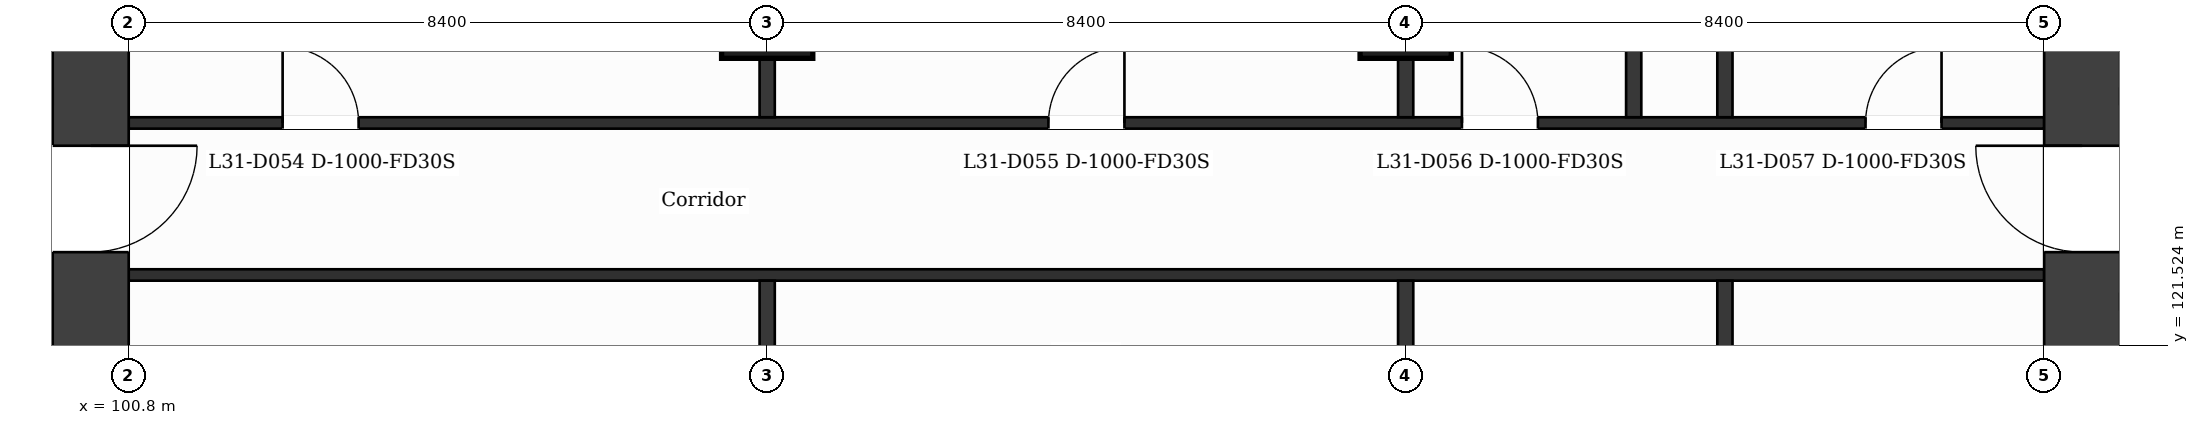
"""IFC4 building model, lengths in metres.
Left out: names, types, materials, properties, quantities, classifications, styles, units other than length and angle.
Written with IfcOpenShell. Run it as: python <this file> out.ifc"""

import sys

from ifc_helpers import new_model, si_unit, direction, frame, frame_2d, origin, origin_2d, place, context, subcontext, project, spatial, rectangle, extrude, element, fill, save


model = new_model("IFC4")
c1 = context("Model", 3, precision=1e-05, world=origin(), true_north=direction((0.0, 1.0)))
c2 = subcontext(c1, "Body", "Model", "MODEL_VIEW")
j1 = project(units=[si_unit("LENGTHUNIT", "METRE"), si_unit("PLANEANGLEUNIT", "RADIAN")], contexts=[c1])
p1 = place(None, origin())
s1 = spatial("IfcSite", under=j1, at=p1, CompositionType="ELEMENT")
p2 = place(p1, origin())
s2 = spatial("IfcBuilding", under=s1, at=p2, CompositionType="ELEMENT")
p3 = place(p2, frame((0.0, 0.0, 131.7)))
s3 = spatial("IfcBuildingStorey", under=s2, at=p3, CompositionType="ELEMENT", Elevation=131.7)
p4 = place(p3, frame((100.3, 131.9, 0.0), z_axis=(0.0, 0.0, 1.0), x_axis=(0.0, -1.0, 0.0)))
e1 = element("IfcWall", 1, at=p4, inside=s3, PredefinedType="SHEAR", context=c2, shape_type="SweptSolid", body=[
    extrude(rectangle(XDim=21.0, YDim=1.0, at=frame_2d((10.5, 0.0))), origin(), (0.0, 0.0, 1.0), 3.7),
])
p5 = place(p4, frame((7.75, 0.0, 0.0)))
e2 = element("IfcOpeningElement", 2, at=p5, cuts=e1, PredefinedType="OPENING", context=c2, shape_type="SweptSolid", body=[
    extrude(rectangle(XDim=1.4, YDim=2.1, at=frame_2d((0.7, 1.05))), frame((0.0, 0.51, 0.0), z_axis=(0.0, -1.0, 0.0), x_axis=(1.0, 0.0, 0.0)), (0.0, 0.0, 1.0), 1.02),
])
p6 = place(p3, frame((126.5, 110.9, 0.0), z_axis=(0.0, 0.0, 1.0), x_axis=(0.0, 1.0, 0.0)))
e3 = element("IfcWall", 3, at=p6, inside=s3, PredefinedType="SHEAR", context=c2, shape_type="SweptSolid", body=[
    extrude(rectangle(XDim=21.0, YDim=1.0, at=frame_2d((10.5, 0.0))), origin(), (0.0, 0.0, 1.0), 3.7),
])
p7 = place(p6, frame((11.85, 0.0, 0.0)))
e4 = element("IfcOpeningElement", 4, at=p7, cuts=e3, PredefinedType="OPENING", context=c2, shape_type="SweptSolid", body=[
    extrude(rectangle(XDim=1.4, YDim=2.1, at=frame_2d((0.7, 1.05))), frame((0.0, 0.51, 0.0), z_axis=(0.0, -1.0, 0.0), x_axis=(1.0, 0.0, 0.0)), (0.0, 0.0, 1.0), 1.02),
])
for number, where, z_axis, x_axis in (
    (5, (109.2, 125.9, 0.0), (0.0, 0.0, 1.0), (1.0, 0.0, 0.0)),
    (6, (117.6, 125.9, 0.0), (0.0, 0.0, 1.0), (1.0, 0.0, 0.0)),
):
    element("IfcColumn", number, at=place(p3, frame(where, z_axis=z_axis, x_axis=x_axis)), inside=s3, PredefinedType="COLUMN", context=c2, shape_type="SweptSolid", body=[
        extrude(rectangle(XDim=1.2, YDim=1.2, at=origin_2d()), origin(), (0.0, 0.0, 1.0), 3.7),
    ])
p8 = place(p3, frame((95.227, 122.1, 0.0), z_axis=(0.0, 0.0, 1.0), x_axis=(1.0, 0.0, 0.0)))
e7 = element("IfcWall", 7, at=p8, inside=s3, PredefinedType="PARTITIONING", context=c2, shape_type="SweptSolid", body=[
    extrude(rectangle(XDim=4.573, YDim=0.2, at=frame_2d((2.287, 0.0))), origin(), (0.0, 0.0, 1.0), 3.2),
])
p9 = place(p8, frame((0.865, 0.0, 0.0)))
e8 = element("IfcOpeningElement", 8, at=p9, cuts=e7, PredefinedType="OPENING", context=c2, shape_type="SweptSolid", body=[
    extrude(rectangle(XDim=0.9, YDim=2.1, at=frame_2d((0.45, 1.05))), frame((0.0, 0.11, 0.0), z_axis=(0.0, -1.0, 0.0), x_axis=(1.0, 0.0, 0.0)), (0.0, 0.0, 1.0), 0.22),
])
p10 = place(p8, frame((2.911, 0.0, 0.0)))
e9 = element("IfcOpeningElement", 9, at=p10, cuts=e7, PredefinedType="OPENING", context=c2, shape_type="SweptSolid", body=[
    extrude(rectangle(XDim=0.9, YDim=2.1, at=frame_2d((0.45, 1.05))), frame((0.0, 0.11, 0.0), z_axis=(0.0, -1.0, 0.0), x_axis=(1.0, 0.0, 0.0)), (0.0, 0.0, 1.0), 0.22),
])
p11 = place(p3, frame((100.8, 122.45, 0.0), z_axis=(0.0, 0.0, 1.0), x_axis=(1.0, 0.0, 0.0)))
e10 = element("IfcWall", 10, at=p11, inside=s3, PredefinedType="PARTITIONING", context=c2, shape_type="SweptSolid", body=[
    extrude(rectangle(XDim=25.2, YDim=0.15, at=frame_2d((12.6, 0.0))), origin(), (0.0, 0.0, 1.0), 3.2),
])
p12 = place(p3, frame((100.8, 124.45, 0.0), z_axis=(0.0, 0.0, 1.0), x_axis=(1.0, 0.0, 0.0)))
e11 = element("IfcWall", 11, at=p12, inside=s3, PredefinedType="PARTITIONING", context=c2, shape_type="SweptSolid", body=[
    extrude(rectangle(XDim=25.2, YDim=0.15, at=frame_2d((12.6, 0.0))), origin(), (0.0, 0.0, 1.0), 3.2),
])
p13 = place(p12, frame((2.025, 0.0, 0.0)))
e12 = element("IfcOpeningElement", 12, at=p13, cuts=e11, PredefinedType="OPENING", context=c2, shape_type="SweptSolid", body=[
    extrude(rectangle(XDim=1.0, YDim=2.1, at=frame_2d((0.5, 1.05))), frame((0.0, 0.085, 0.0), z_axis=(0.0, -1.0, 0.0), x_axis=(1.0, 0.0, 0.0)), (0.0, 0.0, 1.0), 0.17),
])
p14 = place(p12, frame((12.1, 0.0, 0.0)))
e13 = element("IfcOpeningElement", 13, at=p14, cuts=e11, PredefinedType="OPENING", context=c2, shape_type="SweptSolid", body=[
    extrude(rectangle(XDim=1.0, YDim=2.1, at=frame_2d((0.5, 1.05))), frame((0.0, 0.085, 0.0), z_axis=(0.0, -1.0, 0.0), x_axis=(1.0, 0.0, 0.0)), (0.0, 0.0, 1.0), 0.17),
])
p15 = place(p12, frame((17.54, 0.0, 0.0)))
e14 = element("IfcOpeningElement", 14, at=p15, cuts=e11, PredefinedType="OPENING", context=c2, shape_type="SweptSolid", body=[
    extrude(rectangle(XDim=1.0, YDim=2.1, at=frame_2d((0.5, 1.05))), frame((0.0, 0.085, 0.0), z_axis=(0.0, -1.0, 0.0), x_axis=(1.0, 0.0, 0.0)), (0.0, 0.0, 1.0), 0.17),
])
p16 = place(p12, frame((22.85, 0.0, 0.0)))
e15 = element("IfcOpeningElement", 15, at=p16, cuts=e11, PredefinedType="OPENING", context=c2, shape_type="SweptSolid", body=[
    extrude(rectangle(XDim=1.0, YDim=2.1, at=frame_2d((0.5, 1.05))), frame((0.0, 0.085, 0.0), z_axis=(0.0, -1.0, 0.0), x_axis=(1.0, 0.0, 0.0)), (0.0, 0.0, 1.0), 0.17),
])
p17 = place(p3, frame((127.0, 124.8, 0.0), z_axis=(0.0, 0.0, 1.0), x_axis=(1.0, 0.0, 0.0)))
e16 = element("IfcWall", 16, at=p17, inside=s3, PredefinedType="PARTITIONING", context=c2, shape_type="SweptSolid", body=[
    extrude(rectangle(XDim=4.649, YDim=0.2, at=frame_2d((2.324, 0.0))), origin(), (0.0, 0.0, 1.0), 3.2),
])
p18 = place(p17, frame((0.665, 0.0, 0.0)))
e17 = element("IfcOpeningElement", 17, at=p18, cuts=e16, PredefinedType="OPENING", context=c2, shape_type="SweptSolid", body=[
    extrude(rectangle(XDim=1.1, YDim=2.1, at=frame_2d((0.55, 1.05))), frame((0.0, 0.11, 0.0), z_axis=(0.0, -1.0, 0.0), x_axis=(1.0, 0.0, 0.0)), (0.0, 0.0, 1.0), 0.22),
])
p19 = place(p3, frame((109.2, 109.075, 0.0), z_axis=(0.0, 0.0, 1.0), x_axis=(0.0, 1.0, 0.0)))
e18 = element("IfcWall", 18, at=p19, inside=s3, PredefinedType="PARTITIONING", context=c2, shape_type="SweptSolid", body=[
    extrude(rectangle(XDim=13.3, YDim=0.2, at=frame_2d((6.65, 0.0))), origin(), (0.0, 0.0, 1.0), 3.2),
])
p20 = place(p3, frame((109.2, 124.525, 0.0), z_axis=(0.0, 0.0, 1.0), x_axis=(0.0, 1.0, 0.0)))
e19 = element("IfcWall", 19, at=p20, inside=s3, PredefinedType="PARTITIONING", context=c2, shape_type="SweptSolid", body=[
    extrude(rectangle(XDim=9.2, YDim=0.2, at=frame_2d((4.6, 0.0))), origin(), (0.0, 0.0, 1.0), 3.2),
])
p21 = place(p3, frame((117.6, 109.075, 0.0), z_axis=(0.0, 0.0, 1.0), x_axis=(0.0, 1.0, 0.0)))
e20 = element("IfcWall", 20, at=p21, inside=s3, PredefinedType="PARTITIONING", context=c2, shape_type="SweptSolid", body=[
    extrude(rectangle(XDim=13.3, YDim=0.2, at=frame_2d((6.65, 0.0))), origin(), (0.0, 0.0, 1.0), 3.2),
])
p22 = place(p3, frame((117.6, 124.525, 0.0), z_axis=(0.0, 0.0, 1.0), x_axis=(0.0, 1.0, 0.0)))
e21 = element("IfcWall", 21, at=p22, inside=s3, PredefinedType="PARTITIONING", context=c2, shape_type="SweptSolid", body=[
    extrude(rectangle(XDim=9.2, YDim=0.2, at=frame_2d((4.6, 0.0))), origin(), (0.0, 0.0, 1.0), 3.2),
])
p23 = place(p3, frame((120.6, 124.525, 0.0), z_axis=(0.0, 0.0, 1.0), x_axis=(0.0, 1.0, 0.0)))
e22 = element("IfcWall", 22, at=p23, inside=s3, PredefinedType="PARTITIONING", context=c2, shape_type="SweptSolid", body=[
    extrude(rectangle(XDim=5.825, YDim=0.2, at=frame_2d((2.913, 0.0))), origin(), (0.0, 0.0, 1.0), 3.2),
])
p24 = place(p3, frame((121.8, 109.075, 0.0), z_axis=(0.0, 0.0, 1.0), x_axis=(0.0, 1.0, 0.0)))
e23 = element("IfcWall", 23, at=p24, inside=s3, PredefinedType="PARTITIONING", context=c2, shape_type="SweptSolid", body=[
    extrude(rectangle(XDim=13.3, YDim=0.2, at=frame_2d((6.65, 0.0))), origin(), (0.0, 0.0, 1.0), 3.2),
])
p25 = place(p3, frame((121.8, 124.525, 0.0), z_axis=(0.0, 0.0, 1.0), x_axis=(0.0, 1.0, 0.0)))
e24 = element("IfcWall", 24, at=p25, inside=s3, PredefinedType="PARTITIONING", context=c2, shape_type="SweptSolid", body=[
    extrude(rectangle(XDim=9.2, YDim=0.2, at=frame_2d((4.6, 0.0))), origin(), (0.0, 0.0, 1.0), 3.2),
])
p26 = place(p13, origin())
e25 = element("IfcDoor", 25, at=p26, inside=s3, OperationType="SINGLE_SWING_LEFT", PredefinedType="DOOR", context=c2, shape_type="SweptSolid", body=[
    extrude(rectangle(XDim=1.0, YDim=2.1, at=frame_2d((0.5, 1.05))), frame((0.0, 0.025, 0.0), z_axis=(0.0, -1.0, 0.0), x_axis=(1.0, 0.0, 0.0)), (0.0, 0.0, 1.0), 0.05),
])
fill(e12, e25)
p27 = place(p14, origin())
e26 = element("IfcDoor", 26, at=p27, inside=s3, OperationType="SINGLE_SWING_RIGHT", PredefinedType="DOOR", context=c2, shape_type="SweptSolid", body=[
    extrude(rectangle(XDim=1.0, YDim=2.1, at=frame_2d((0.5, 1.05))), frame((0.0, 0.025, 0.0), z_axis=(0.0, -1.0, 0.0), x_axis=(1.0, 0.0, 0.0)), (0.0, 0.0, 1.0), 0.05),
])
fill(e13, e26)
p28 = place(p15, origin())
e27 = element("IfcDoor", 27, at=p28, inside=s3, OperationType="SINGLE_SWING_LEFT", PredefinedType="DOOR", context=c2, shape_type="SweptSolid", body=[
    extrude(rectangle(XDim=1.0, YDim=2.1, at=frame_2d((0.5, 1.05))), frame((0.0, 0.025, 0.0), z_axis=(0.0, -1.0, 0.0), x_axis=(1.0, 0.0, 0.0)), (0.0, 0.0, 1.0), 0.05),
])
fill(e14, e27)
p29 = place(p16, origin())
e28 = element("IfcDoor", 28, at=p29, inside=s3, OperationType="SINGLE_SWING_RIGHT", PredefinedType="DOOR", context=c2, shape_type="SweptSolid", body=[
    extrude(rectangle(XDim=1.0, YDim=2.1, at=frame_2d((0.5, 1.05))), frame((0.0, 0.025, 0.0), z_axis=(0.0, -1.0, 0.0), x_axis=(1.0, 0.0, 0.0)), (0.0, 0.0, 1.0), 0.05),
])
fill(e15, e28)
p30 = place(p5, origin())
e29 = element("IfcDoor", 29, at=p30, inside=s3, OperationType="SINGLE_SWING_LEFT", PredefinedType="DOOR", context=c2, shape_type="SweptSolid", body=[
    extrude(rectangle(XDim=1.4, YDim=2.1, at=frame_2d((0.7, 1.05))), frame((0.0, 0.025, 0.0), z_axis=(0.0, -1.0, 0.0), x_axis=(1.0, 0.0, 0.0)), (0.0, 0.0, 1.0), 0.05),
])
fill(e2, e29)
p31 = place(p7, origin())
e30 = element("IfcDoor", 30, at=p31, inside=s3, OperationType="SINGLE_SWING_RIGHT", PredefinedType="DOOR", context=c2, shape_type="SweptSolid", body=[
    extrude(rectangle(XDim=1.4, YDim=2.1, at=frame_2d((0.7, 1.05))), frame((0.0, 0.025, 0.0), z_axis=(0.0, -1.0, 0.0), x_axis=(1.0, 0.0, 0.0)), (0.0, 0.0, 1.0), 0.05),
])
fill(e4, e30)
save(model, sys.argv[1])
